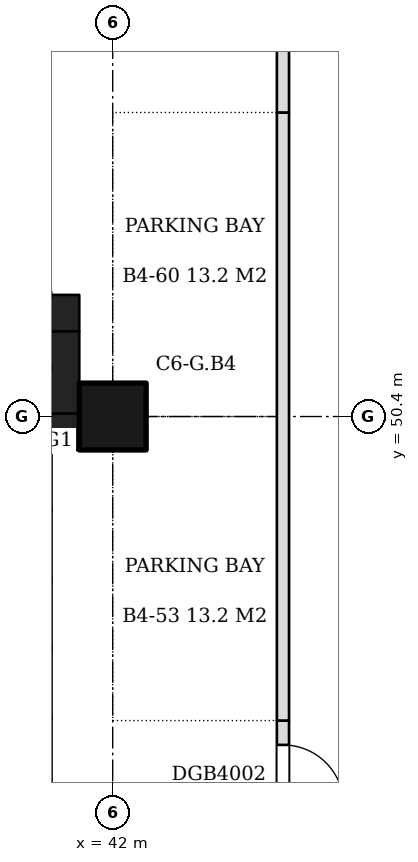
"""IFC4 building model, lengths in metres.
Left out: names, types, materials, properties, quantities, classifications, styles, units other than length and angle.
Written with IfcOpenShell. Run it as: python <this file> out.ifc"""

import sys

from ifc_helpers import new_model, si_unit, direction, frame, frame_2d, origin, origin_2d, place, context, subcontext, project, spatial, rectangle, extrude, element, fill, save


model = new_model("IFC4")
c1 = context("Model", 3, precision=1e-05, world=origin(), true_north=direction((0.0, 1.0)))
c2 = subcontext(c1, "Body", "Model", "MODEL_VIEW")
j1 = project(units=[si_unit("LENGTHUNIT", "METRE"), si_unit("PLANEANGLEUNIT", "RADIAN")], contexts=[c1])
p1 = place(None, origin())
s1 = spatial("IfcSite", under=j1, at=p1, CompositionType="ELEMENT")
p2 = place(p1, origin())
s2 = spatial("IfcBuilding", under=s1, at=p2, CompositionType="ELEMENT")
p3 = place(p2, frame((0.0, 0.0, -16.0)))
s3 = spatial("IfcBuildingStorey", under=s2, at=p3, CompositionType="ELEMENT", Elevation=-16.0)
p4 = place(p3, frame((42.0, 50.4, 0.0), z_axis=(0.0, 0.0, 1.0), x_axis=(1.0, 0.0, 0.0)))
e1 = element("IfcColumn", 1, at=p4, inside=s3, PredefinedType="COLUMN", context=c2, shape_type="SweptSolid", body=[
    extrude(rectangle(XDim=1.1, YDim=1.1, at=origin_2d()), origin(), (0.0, 0.0, 1.0), 3.7),
])
p5 = place(p3, frame((44.8, 38.6, 0.0), z_axis=(0.0, 0.0, 1.0), x_axis=(0.0, 1.0, 0.0)))
e2 = element("IfcWall", 2, at=p5, inside=s3, PredefinedType="PARTITIONING", context=c2, shape_type="SweptSolid", body=[
    extrude(rectangle(XDim=6.8, YDim=0.2, at=frame_2d((3.4, 0.0))), origin(), (0.0, 0.0, 1.0), 3.7),
])
p6 = place(p5, frame((0.3, 0.0, 0.0)))
e3 = element("IfcOpeningElement", 3, at=p6, cuts=e2, PredefinedType="OPENING", context=c2, shape_type="SweptSolid", body=[
    extrude(rectangle(XDim=4.8, YDim=2.4, at=frame_2d((2.4, 1.2))), frame((0.0, 0.11, 0.0), z_axis=(0.0, -1.0, 0.0), x_axis=(1.0, 0.0, 0.0)), (0.0, 0.0, 1.0), 0.22),
])
p7 = place(p5, frame((5.4, 0.0, 0.0)))
e4 = element("IfcOpeningElement", 4, at=p7, cuts=e2, PredefinedType="OPENING", context=c2, shape_type="SweptSolid", body=[
    extrude(rectangle(XDim=1.0, YDim=2.1, at=frame_2d((0.5, 1.05))), frame((0.0, 0.11, 0.0), z_axis=(0.0, -1.0, 0.0), x_axis=(1.0, 0.0, 0.0)), (0.0, 0.0, 1.0), 0.22),
])
p8 = place(p3, frame((44.8, 45.4, 0.0), z_axis=(0.0, 0.0, 1.0), x_axis=(0.0, 1.0, 0.0)))
e5 = element("IfcWall", 5, at=p8, inside=s3, PredefinedType="PARTITIONING", context=c2, shape_type="SweptSolid", body=[
    extrude(rectangle(XDim=10.0, YDim=0.2, at=frame_2d((5.0, 0.0))), origin(), (0.0, 0.0, 1.0), 3.7),
])
p9 = place(p3, frame((44.8, 55.4, 0.0), z_axis=(0.0, 0.0, 1.0), x_axis=(0.0, 1.0, 0.0)))
e6 = element("IfcWall", 6, at=p9, inside=s3, PredefinedType="PARTITIONING", context=c2, shape_type="SweptSolid", body=[
    extrude(rectangle(XDim=3.0, YDim=0.2, at=frame_2d((1.5, 0.0))), origin(), (0.0, 0.0, 1.0), 3.7),
])
for number, where, z_axis, x_axis in (
    (7, (34.15, 50.15, 0.0), (0.0, 0.0, 1.0), (1.0, 0.0, 0.0)),
    (8, (34.15, 52.1, 0.0), (0.0, 0.0, 1.0), (1.0, 0.0, 0.0)),
):
    element("IfcWall", number, at=place(p3, frame(where, z_axis=z_axis, x_axis=x_axis)), inside=s3, PredefinedType="SOLIDWALL", context=c2, shape_type="SweptSolid", body=[
        extrude(rectangle(XDim=7.3, YDim=0.6, at=frame_2d((3.65, 0.0))), origin(), (0.0, 0.0, 1.0), 3.52),
    ])
p10 = place(p3, frame((41.15, 50.45, 0.0), z_axis=(0.0, 0.0, 1.0), x_axis=(0.0, 1.0, 0.0)))
e9 = element("IfcWall", 9, at=p10, inside=s3, PredefinedType="SOLIDWALL", context=c2, shape_type="SweptSolid", body=[
    extrude(rectangle(XDim=1.35, YDim=0.6, at=frame_2d((0.675, 0.0))), origin(), (0.0, 0.0, 1.0), 3.52),
])
p11 = place(p7, frame((1.0, 0.0, 0.0), z_axis=(0.0, 0.0, 1.0), x_axis=(-1.0, 0.0, 0.0)))
e10 = element("IfcDoor", 10, at=p11, inside=s3, OperationType="SINGLE_SWING_RIGHT", PredefinedType="DOOR", context=c2, shape_type="SweptSolid", body=[
    extrude(rectangle(XDim=1.0, YDim=2.1, at=frame_2d((0.5, 1.05))), frame((0.0, 0.025, 0.0), z_axis=(0.0, -1.0, 0.0), x_axis=(1.0, 0.0, 0.0)), (0.0, 0.0, 1.0), 0.05),
])
fill(e4, e10)
save(model, sys.argv[1])
